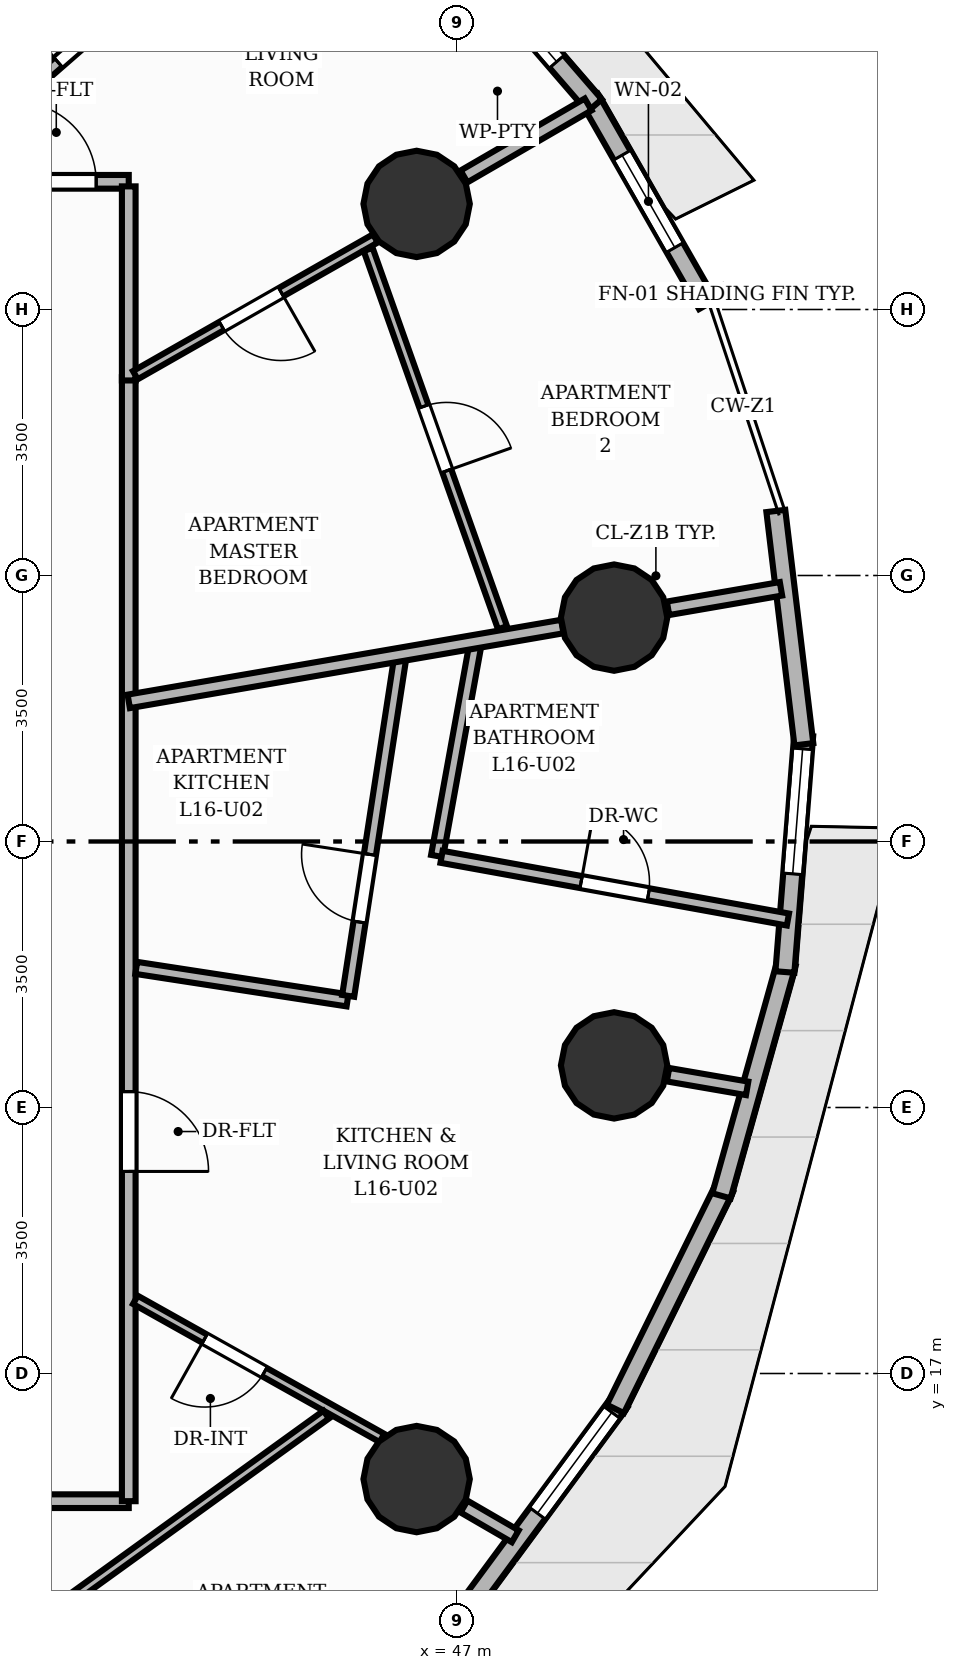
"""IFC4 building model, lengths in metres.
Left out: names, types, materials, properties, quantities, classifications, styles, units other than length and angle.
Written with IfcOpenShell. Run it as: python <this file> out.ifc"""

import sys

from ifc_helpers import new_model, si_unit, direction, frame, frame_2d, origin, origin_2d, place, context, subcontext, project, spatial, rectangle, circle, extrude, element, fill, save


model = new_model("IFC4")
c1 = context("Model", 3, precision=1e-05, world=origin(), true_north=direction((0.0, 1.0)))
c2 = subcontext(c1, "Body", "Model", "MODEL_VIEW")
j1 = project(units=[si_unit("LENGTHUNIT", "METRE"), si_unit("PLANEANGLEUNIT", "RADIAN")], contexts=[c1])
p1 = place(None, origin())
s1 = spatial("IfcSite", under=j1, at=p1, CompositionType="ELEMENT")
p2 = place(p1, origin())
s2 = spatial("IfcBuilding", under=s1, at=p2, CompositionType="ELEMENT")
p3 = place(p2, frame((0.0, 0.0, 56.8)))
s3 = spatial("IfcBuildingStorey", under=s2, at=p3, CompositionType="ELEMENT", Elevation=56.8)
for number, where, z_axis, x_axis in (
    (1, (49.066, 26.946, 0.0), (0.0, 0.0, 1.0), (1.0, 0.0, 0.0)),
    (2, (46.468, 32.389, 0.0), (0.0, 0.0, 1.0), (1.0, 0.0, 0.0)),
    (3, (46.468, 15.611, 0.0), (0.0, 0.0, 1.0), (1.0, 0.0, 0.0)),
    (4, (49.066, 21.054, 0.0), (0.0, 0.0, 1.0), (1.0, 0.0, 0.0)),
):
    element("IfcColumn", number, at=place(p3, frame(where, z_axis=z_axis, x_axis=x_axis)), inside=s3, PredefinedType="COLUMN", context=c2, shape_type="SweptSolid", body=[
        extrude(circle(Radius=0.7, at=origin_2d()), origin(), (0.0, 0.0, 1.0), 3.2),
    ])
p4 = place(p3, frame((48.744, 33.777, 0.0), z_axis=(0.0, 0.0, 1.0), x_axis=(0.496155788519, -0.868233513243, 0.0)))
e5 = element("IfcWall", 5, at=p4, inside=s3, PredefinedType="SOLIDWALL", context=c2, shape_type="SweptSolid", body=[
    extrude(rectangle(XDim=3.121, YDim=0.25, at=frame_2d((1.56, 0.0))), origin(), (0.0, 0.0, 1.0), 2.96),
])
p5 = place(p4, frame((0.86, 0.0, 0.85)))
e6 = element("IfcOpeningElement", 6, at=p5, cuts=e5, PredefinedType="OPENING", context=c2, shape_type="SweptSolid", body=[
    extrude(rectangle(XDim=1.4, YDim=1.55, at=frame_2d((0.7, 0.775))), frame((0.0, 0.135, 0.0), z_axis=(0.0, -1.0, 0.0), x_axis=(1.0, 0.0, 0.0)), (0.0, 0.0, 1.0), 0.27),
])
p6 = place(p3, frame((46.734, 36.086, 0.0), z_axis=(0.0, 0.0, 1.0), x_axis=(0.653770062489, -0.75669327035, 0.0)))
e7 = element("IfcWall", 7, at=p6, inside=s3, PredefinedType="SOLIDWALL", context=c2, shape_type="SweptSolid", body=[
    extrude(rectangle(XDim=3.174, YDim=0.25, at=frame_2d((1.587, 0.0))), origin(), (0.0, 0.0, 1.0), 2.96),
])
p7 = place(p6, frame((0.762, 0.0, 0.85)))
e8 = element("IfcOpeningElement", 8, at=p7, cuts=e7, PredefinedType="OPENING", context=c2, shape_type="SweptSolid", body=[
    extrude(rectangle(XDim=1.65, YDim=1.55, at=frame_2d((0.825, 0.775))), frame((0.0, 0.135, 0.0), z_axis=(0.0, -1.0, 0.0), x_axis=(1.0, 0.0, 0.0)), (0.0, 0.0, 1.0), 0.27),
])
p8 = place(p3, frame((49.14, 16.629, 0.0), z_axis=(0.0, 0.0, 1.0), x_axis=(-0.593762827217, -0.804640109003, 0.0)))
e9 = element("IfcWall", 9, at=p8, inside=s3, PredefinedType="SOLIDWALL", context=c2, shape_type="SweptSolid", body=[
    extrude(rectangle(XDim=3.323, YDim=0.25, at=frame_2d((1.661, 0.0))), origin(), (0.0, 0.0, 1.0), 2.96),
])
p9 = place(p8, frame((0.175, 0.0, 0.85)))
e10 = element("IfcOpeningElement", 10, at=p9, cuts=e9, PredefinedType="OPENING", context=c2, shape_type="SweptSolid", body=[
    extrude(rectangle(XDim=1.65, YDim=1.55, at=frame_2d((0.825, 0.775))), frame((0.0, 0.135, 0.0), z_axis=(0.0, -1.0, 0.0), x_axis=(1.0, 0.0, 0.0)), (0.0, 0.0, 1.0), 0.27),
])
p10 = place(p3, frame((50.518, 19.443, 0.0), z_axis=(0.0, 0.0, 1.0), x_axis=(-0.44260255462, -0.896717892452, 0.0)))
e11 = element("IfcWall", 11, at=p10, inside=s3, PredefinedType="SOLIDWALL", context=c2, shape_type="SweptSolid", body=[
    extrude(rectangle(XDim=3.245, YDim=0.25, at=frame_2d((1.622, 0.0))), origin(), (0.0, 0.0, 1.0), 2.96),
])
p11 = place(p3, frame((51.333, 22.395, 0.0), z_axis=(0.0, 0.0, 1.0), x_axis=(-0.269353183383, -0.963041464632, 0.0)))
e12 = element("IfcWall", 12, at=p11, inside=s3, PredefinedType="SOLIDWALL", context=c2, shape_type="SweptSolid", body=[
    extrude(rectangle(XDim=3.174, YDim=0.25, at=frame_2d((1.587, 0.0))), origin(), (0.0, 0.0, 1.0), 2.96),
])
p12 = place(p3, frame((51.56, 25.394, 0.0), z_axis=(0.0, 0.0, 1.0), x_axis=(-0.079173066737, -0.996860885733, 0.0)))
e13 = element("IfcWall", 13, at=p12, inside=s3, PredefinedType="SOLIDWALL", context=c2, shape_type="SweptSolid", body=[
    extrude(rectangle(XDim=3.121, YDim=0.25, at=frame_2d((1.56, 0.0))), origin(), (0.0, 0.0, 1.0), 2.96),
])
p13 = place(p12, frame((0.175, 0.0, 0.85)))
e14 = element("IfcOpeningElement", 14, at=p13, cuts=e13, PredefinedType="OPENING", context=c2, shape_type="SweptSolid", body=[
    extrude(rectangle(XDim=1.65, YDim=1.55, at=frame_2d((0.825, 0.775))), frame((0.0, 0.135, 0.0), z_axis=(0.0, -1.0, 0.0), x_axis=(1.0, 0.0, 0.0)), (0.0, 0.0, 1.0), 0.27),
])
p14 = place(p3, frame((51.194, 28.349, 0.0), z_axis=(0.0, 0.0, 1.0), x_axis=(0.119310240224, -0.992857022223, 0.0)))
e15 = element("IfcWall", 15, at=p14, inside=s3, PredefinedType="SOLIDWALL", context=c2, shape_type="SweptSolid", body=[
    extrude(rectangle(XDim=3.092, YDim=0.25, at=frame_2d((1.546, 0.0))), origin(), (0.0, 0.0, 1.0), 2.96),
])
p15 = place(p3, frame((49.775, 27.068, 0.0), z_axis=(0.0, 0.0, 1.0), x_axis=(0.985418960314, 0.170145445587, 0.0)))
e16 = element("IfcWall", 16, at=p15, inside=s3, PredefinedType="PARTITIONING", context=c2, shape_type="SweptSolid", body=[
    extrude(rectangle(XDim=1.508, YDim=0.18, at=frame_2d((0.754, 0.0))), origin(), (0.0, 0.0, 1.0), 2.178),
])
p16 = place(p3, frame((47.091, 32.75, 0.0), z_axis=(0.0, 0.0, 1.0), x_axis=(0.865027823723, 0.501723892379, 0.0)))
e17 = element("IfcWall", 17, at=p16, inside=s3, PredefinedType="PARTITIONING", context=c2, shape_type="SweptSolid", body=[
    extrude(rectangle(XDim=1.889, YDim=0.18, at=frame_2d((0.944, 0.0))), origin(), (0.0, 0.0, 1.0), 2.178),
])
p17 = place(p3, frame((47.091, 15.25, 0.0), z_axis=(0.0, 0.0, 1.0), x_axis=(0.86504748832, -0.501689986895, 0.0)))
e18 = element("IfcWall", 18, at=p17, inside=s3, PredefinedType="PARTITIONING", context=c2, shape_type="SweptSolid", body=[
    extrude(rectangle(XDim=0.78, YDim=0.18, at=frame_2d((0.39, 0.0))), origin(), (0.0, 0.0, 1.0), 2.178),
])
p18 = place(p3, frame((49.775, 20.932, 0.0), z_axis=(0.0, 0.0, 1.0), x_axis=(0.985428074572, -0.17009265077, 0.0)))
e19 = element("IfcWall", 19, at=p18, inside=s3, PredefinedType="PARTITIONING", context=c2, shape_type="SweptSolid", body=[
    extrude(rectangle(XDim=1.056, YDim=0.18, at=frame_2d((0.528, 0.0))), origin(), (0.0, 0.0, 1.0), 2.178),
])
p19 = place(p3, frame((42.68, 15.32, 0.0), z_axis=(0.0, 0.0, 1.0), x_axis=(-1.0, 0.0, 0.0)))
e20 = element("IfcWall", 20, at=p19, inside=s3, PredefinedType="PARTITIONING", context=c2, shape_type="SweptSolid", body=[
    extrude(rectangle(XDim=13.87, YDim=0.18, at=frame_2d((6.935, 0.0))), origin(), (0.0, 0.0, 1.0), 2.955),
])
p20 = place(p19, frame((9.866, 0.0, 0.0)))
e21 = element("IfcOpeningElement", 21, at=p20, cuts=e20, PredefinedType="OPENING", context=c2, shape_type="SweptSolid", body=[
    extrude(rectangle(XDim=0.9, YDim=2.1, at=frame_2d((0.45, 1.05))), frame((0.0, 0.1, 0.0), z_axis=(0.0, -1.0, 0.0), x_axis=(1.0, 0.0, 0.0)), (0.0, 0.0, 1.0), 0.2),
])
p21 = place(p3, frame((42.68, 30.109, 0.0), z_axis=(0.0, 0.0, 1.0), x_axis=(0.0, -1.0, 0.0)))
e22 = element("IfcWall", 22, at=p21, inside=s3, PredefinedType="PARTITIONING", context=c2, shape_type="SweptSolid", body=[
    extrude(rectangle(XDim=14.789, YDim=0.18, at=frame_2d((7.395, 0.0))), origin(), (0.0, 0.0, 1.0), 2.955),
])
p22 = place(p21, frame((9.4, 0.0, 0.0)))
e23 = element("IfcOpeningElement", 23, at=p22, cuts=e22, PredefinedType="OPENING", context=c2, shape_type="SweptSolid", body=[
    extrude(rectangle(XDim=1.05, YDim=2.15, at=frame_2d((0.525, 1.075))), frame((0.0, 0.1, 0.0), z_axis=(0.0, -1.0, 0.0), x_axis=(1.0, 0.0, 0.0)), (0.0, 0.0, 1.0), 0.2),
])
p23 = place(p3, frame((33.988, 32.68, 0.0), z_axis=(0.0, 0.0, 1.0), x_axis=(1.0, 0.0, 0.0)))
e24 = element("IfcWall", 24, at=p23, inside=s3, PredefinedType="PARTITIONING", context=c2, shape_type="SweptSolid", body=[
    extrude(rectangle(XDim=8.692, YDim=0.18, at=frame_2d((4.346, 0.0))), origin(), (0.0, 0.0, 1.0), 2.955),
])
p24 = place(p23, frame((7.213, 0.0, 0.0)))
e25 = element("IfcOpeningElement", 25, at=p24, cuts=e24, PredefinedType="OPENING", context=c2, shape_type="SweptSolid", body=[
    extrude(rectangle(XDim=1.05, YDim=2.15, at=frame_2d((0.525, 1.075))), frame((0.0, 0.1, 0.0), z_axis=(0.0, -1.0, 0.0), x_axis=(1.0, 0.0, 0.0)), (0.0, 0.0, 1.0), 0.2),
])
p25 = place(p3, frame((42.68, 32.62, 0.0), z_axis=(0.0, 0.0, 1.0), x_axis=(0.0, -1.0, 0.0)))
e26 = element("IfcWall", 26, at=p25, inside=s3, PredefinedType="PARTITIONING", context=c2, shape_type="SweptSolid", body=[
    extrude(rectangle(XDim=2.554, YDim=0.18, at=frame_2d((1.277, 0.0))), origin(), (0.0, 0.0, 1.0), 2.955),
])
p26 = place(p3, frame((47.248, 26.632, 0.0), z_axis=(0.0, 0.0, 1.0), x_axis=(-0.1781964362, -0.983994933994, 0.0)))
e27 = element("IfcWall", 27, at=p26, inside=s3, PredefinedType="PLUMBINGWALL", context=c2, shape_type="SweptSolid", body=[
    extrude(rectangle(XDim=2.869, YDim=0.16, at=frame_2d((1.435, 0.0))), origin(), (0.0, 0.0, 1.0), 2.955),
])
p27 = place(p3, frame((46.796, 23.799, 0.0), z_axis=(0.0, 0.0, 1.0), x_axis=(0.983988618973, -0.178231304015, 0.0)))
e28 = element("IfcWall", 28, at=p27, inside=s3, PredefinedType="PLUMBINGWALL", context=c2, shape_type="SweptSolid", body=[
    extrude(rectangle(XDim=4.631, YDim=0.16, at=frame_2d((2.316, 0.0))), origin(), (0.0, 0.0, 1.0), 2.955),
])
p28 = place(p27, frame((1.866, 0.0, 0.0)))
e29 = element("IfcOpeningElement", 29, at=p28, cuts=e28, PredefinedType="OPENING", context=c2, shape_type="SweptSolid", body=[
    extrude(rectangle(XDim=0.9, YDim=2.1, at=frame_2d((0.45, 1.05))), frame((0.0, 0.09, 0.0), z_axis=(0.0, -1.0, 0.0), x_axis=(1.0, 0.0, 0.0)), (0.0, 0.0, 1.0), 0.18),
])
p29 = place(p3, frame((46.011, 16.152, 0.0), z_axis=(0.0, 0.0, 1.0), x_axis=(-0.872501537555, 0.488611365978, 0.0)))
e30 = element("IfcWall", 30, at=p29, inside=s3, PredefinedType="PARTITIONING", context=c2, shape_type="SweptSolid", body=[
    extrude(rectangle(XDim=3.719, YDim=0.125, at=frame_2d((1.859, 0.0))), origin(), (0.0, 0.0, 1.0), 2.178),
])
p30 = place(p29, frame((1.773, 0.0, 0.0)))
e31 = element("IfcOpeningElement", 31, at=p30, cuts=e30, PredefinedType="OPENING", context=c2, shape_type="SweptSolid", body=[
    extrude(rectangle(XDim=0.9, YDim=2.1, at=frame_2d((0.45, 1.05))), frame((0.0, 0.073, 0.0), z_axis=(0.0, -1.0, 0.0), x_axis=(1.0, 0.0, 0.0)), (0.0, 0.0, 1.0), 0.145),
])
p31 = place(p3, frame((42.779, 22.337, 0.0), z_axis=(0.0, 0.0, 1.0), x_axis=(0.9883767157, -0.152024563351, 0.0)))
e32 = element("IfcWall", 32, at=p31, inside=s3, PredefinedType="PLUMBINGWALL", context=c2, shape_type="SweptSolid", body=[
    extrude(rectangle(XDim=2.812, YDim=0.16, at=frame_2d((1.406, 0.0))), origin(), (0.0, 0.0, 1.0), 2.178),
])
p32 = place(p3, frame((45.567, 21.969, 0.0), z_axis=(0.0, 0.0, 1.0), x_axis=(0.152061220482, 0.988371076684, 0.0)))
e33 = element("IfcWall", 33, at=p32, inside=s3, PredefinedType="PLUMBINGWALL", context=c2, shape_type="SweptSolid", body=[
    extrude(rectangle(XDim=4.545, YDim=0.16, at=frame_2d((2.273, 0.0))), origin(), (0.0, 0.0, 1.0), 2.955),
])
p33 = place(p32, frame((0.983, 0.0, 0.0)))
e34 = element("IfcOpeningElement", 34, at=p33, cuts=e33, PredefinedType="OPENING", context=c2, shape_type="SweptSolid", body=[
    extrude(rectangle(XDim=0.9, YDim=2.1, at=frame_2d((0.45, 1.05))), frame((0.0, 0.09, 0.0), z_axis=(0.0, -1.0, 0.0), x_axis=(1.0, 0.0, 0.0)), (0.0, 0.0, 1.0), 0.18),
])
p34 = place(p3, frame((42.68, 25.844, 0.0), z_axis=(0.0, 0.0, 1.0), x_axis=(0.985422105898, 0.170127226534, 0.0)))
e35 = element("IfcWall", 35, at=p34, inside=s3, PredefinedType="PARTITIONING", context=c2, shape_type="SweptSolid", body=[
    extrude(rectangle(XDim=5.789, YDim=0.18, at=frame_2d((2.895, 0.0))), origin(), (0.0, 0.0, 1.0), 2.178),
])
p35 = place(p3, frame((45.278, 16.459, 0.0), z_axis=(0.0, 0.0, 1.0), x_axis=(-0.810668637761, -0.585505217526, 0.0)))
e36 = element("IfcWall", 36, at=p35, inside=s3, PredefinedType="PARTITIONING", context=c2, shape_type="SweptSolid", body=[
    extrude(rectangle(XDim=11.55, YDim=0.125, at=frame_2d((5.775, 0.0))), origin(), (0.0, 0.0, 1.0), 2.955),
])
p36 = place(p35, frame((4.625, 0.0, 0.0)))
e37 = element("IfcOpeningElement", 37, at=p36, cuts=e36, PredefinedType="OPENING", context=c2, shape_type="SweptSolid", body=[
    extrude(rectangle(XDim=0.9, YDim=2.1, at=frame_2d((0.45, 1.05))), frame((0.0, 0.073, 0.0), z_axis=(0.0, -1.0, 0.0), x_axis=(1.0, 0.0, 0.0)), (0.0, 0.0, 1.0), 0.145),
])
p37 = place(p3, frame((40.028, 32.746, 0.0), z_axis=(0.0, 0.0, 1.0), x_axis=(0.753328390337, 0.657644536442, 0.0)))
e38 = element("IfcWall", 38, at=p37, inside=s3, PredefinedType="PLUMBINGWALL", context=c2, shape_type="SweptSolid", body=[
    extrude(rectangle(XDim=6.876, YDim=0.16, at=frame_2d((3.438, 0.0))), origin(), (0.0, 0.0, 1.0), 2.955),
])
p38 = place(p37, frame((2.288, 0.0, 0.0)))
e39 = element("IfcOpeningElement", 39, at=p38, cuts=e38, PredefinedType="OPENING", context=c2, shape_type="SweptSolid", body=[
    extrude(rectangle(XDim=0.9, YDim=2.1, at=frame_2d((0.45, 1.05))), frame((0.0, 0.09, 0.0), z_axis=(0.0, -1.0, 0.0), x_axis=(1.0, 0.0, 0.0)), (0.0, 0.0, 1.0), 0.18),
])
p39 = place(p3, frame((45.925, 31.936, 0.0), z_axis=(0.0, 0.0, 1.0), x_axis=(-0.868837650683, -0.49509709831, 0.0)))
e40 = element("IfcWall", 40, at=p39, inside=s3, PredefinedType="PARTITIONING", context=c2, shape_type="SweptSolid", body=[
    extrude(rectangle(XDim=3.635, YDim=0.125, at=frame_2d((1.818, 0.0))), origin(), (0.0, 0.0, 1.0), 2.178),
])
p40 = place(p39, frame((1.428, 0.0, 0.0)))
e41 = element("IfcOpeningElement", 41, at=p40, cuts=e40, PredefinedType="OPENING", context=c2, shape_type="SweptSolid", body=[
    extrude(rectangle(XDim=0.9, YDim=2.1, at=frame_2d((0.45, 1.05))), frame((0.0, 0.073, 0.0), z_axis=(0.0, -1.0, 0.0), x_axis=(1.0, 0.0, 0.0)), (0.0, 0.0, 1.0), 0.145),
])
p41 = place(p3, frame((45.83, 31.79, 0.0), z_axis=(0.0, 0.0, 1.0), x_axis=(0.334664074365, -0.94233749651, 0.0)))
e42 = element("IfcWall", 42, at=p41, inside=s3, PredefinedType="PARTITIONING", context=c2, shape_type="SweptSolid", body=[
    extrude(rectangle(XDim=5.282, YDim=0.125, at=frame_2d((2.641, 0.0))), origin(), (0.0, 0.0, 1.0), 2.955),
])
p42 = place(p41, frame((2.191, 0.0, 0.0)))
e43 = element("IfcOpeningElement", 43, at=p42, cuts=e42, PredefinedType="OPENING", context=c2, shape_type="SweptSolid", body=[
    extrude(rectangle(XDim=0.9, YDim=2.1, at=frame_2d((0.45, 1.05))), frame((0.0, 0.073, 0.0), z_axis=(0.0, -1.0, 0.0), x_axis=(1.0, 0.0, 0.0)), (0.0, 0.0, 1.0), 0.145),
])
p43 = place(p5, origin())
e44 = element("IfcWindow", 44, at=p43, inside=s3, PartitioningType="SINGLE_PANEL", PredefinedType="WINDOW", context=c2, shape_type="SweptSolid", body=[
    extrude(rectangle(XDim=1.4, YDim=1.55, at=frame_2d((0.7, 0.775))), frame((0.0, 0.03, 0.0), z_axis=(0.0, -1.0, 0.0), x_axis=(1.0, 0.0, 0.0)), (0.0, 0.0, 1.0), 0.06),
])
fill(e6, e44)
p44 = place(p7, origin())
e45 = element("IfcWindow", 45, at=p44, inside=s3, PartitioningType="SINGLE_PANEL", PredefinedType="WINDOW", context=c2, shape_type="SweptSolid", body=[
    extrude(rectangle(XDim=1.65, YDim=1.55, at=frame_2d((0.825, 0.775))), frame((0.0, 0.03, 0.0), z_axis=(0.0, -1.0, 0.0), x_axis=(1.0, 0.0, 0.0)), (0.0, 0.0, 1.0), 0.06),
])
fill(e8, e45)
p45 = place(p9, origin())
e46 = element("IfcWindow", 46, at=p45, inside=s3, PartitioningType="SINGLE_PANEL", PredefinedType="WINDOW", context=c2, shape_type="SweptSolid", body=[
    extrude(rectangle(XDim=1.65, YDim=1.55, at=frame_2d((0.825, 0.775))), frame((0.0, 0.03, 0.0), z_axis=(0.0, -1.0, 0.0), x_axis=(1.0, 0.0, 0.0)), (0.0, 0.0, 1.0), 0.06),
])
fill(e10, e46)
p46 = place(p13, origin())
e47 = element("IfcWindow", 47, at=p46, inside=s3, PartitioningType="SINGLE_PANEL", PredefinedType="WINDOW", context=c2, shape_type="SweptSolid", body=[
    extrude(rectangle(XDim=1.65, YDim=1.55, at=frame_2d((0.825, 0.775))), frame((0.0, 0.03, 0.0), z_axis=(0.0, -1.0, 0.0), x_axis=(1.0, 0.0, 0.0)), (0.0, 0.0, 1.0), 0.06),
])
fill(e14, e47)
p47 = place(p22, origin())
e48 = element("IfcDoor", 48, at=p47, inside=s3, OperationType="SINGLE_SWING_RIGHT", PredefinedType="DOOR", context=c2, shape_type="SweptSolid", body=[
    extrude(rectangle(XDim=1.05, YDim=2.15, at=frame_2d((0.525, 1.075))), frame((0.0, 0.025, 0.0), z_axis=(0.0, -1.0, 0.0), x_axis=(1.0, 0.0, 0.0)), (0.0, 0.0, 1.0), 0.05),
])
fill(e23, e48)
p48 = place(p28, origin())
e49 = element("IfcDoor", 49, at=p48, inside=s3, OperationType="SINGLE_SWING_LEFT", PredefinedType="DOOR", context=c2, shape_type="SweptSolid", body=[
    extrude(rectangle(XDim=0.9, YDim=2.1, at=frame_2d((0.45, 1.05))), frame((0.0, 0.025, 0.0), z_axis=(0.0, -1.0, 0.0), x_axis=(1.0, 0.0, 0.0)), (0.0, 0.0, 1.0), 0.05),
])
fill(e29, e49)
p49 = place(p30, origin())
e50 = element("IfcDoor", 50, at=p49, inside=s3, OperationType="SINGLE_SWING_RIGHT", PredefinedType="DOOR", context=c2, shape_type="SweptSolid", body=[
    extrude(rectangle(XDim=0.9, YDim=2.1, at=frame_2d((0.45, 1.05))), frame((0.0, 0.025, 0.0), z_axis=(0.0, -1.0, 0.0), x_axis=(1.0, 0.0, 0.0)), (0.0, 0.0, 1.0), 0.05),
])
fill(e31, e50)
p50 = place(p33, origin())
e51 = element("IfcDoor", 51, at=p50, inside=s3, OperationType="SINGLE_SWING_RIGHT", PredefinedType="DOOR", context=c2, shape_type="SweptSolid", body=[
    extrude(rectangle(XDim=0.9, YDim=2.1, at=frame_2d((0.45, 1.05))), frame((0.0, 0.025, 0.0), z_axis=(0.0, -1.0, 0.0), x_axis=(1.0, 0.0, 0.0)), (0.0, 0.0, 1.0), 0.05),
])
fill(e34, e51)
p51 = place(p24, origin())
e52 = element("IfcDoor", 52, at=p51, inside=s3, OperationType="SINGLE_SWING_LEFT", PredefinedType="DOOR", context=c2, shape_type="SweptSolid", body=[
    extrude(rectangle(XDim=1.05, YDim=2.15, at=frame_2d((0.525, 1.075))), frame((0.0, 0.025, 0.0), z_axis=(0.0, -1.0, 0.0), x_axis=(1.0, 0.0, 0.0)), (0.0, 0.0, 1.0), 0.05),
])
fill(e25, e52)
p52 = place(p38, origin())
e53 = element("IfcDoor", 53, at=p52, inside=s3, OperationType="SINGLE_SWING_RIGHT", PredefinedType="DOOR", context=c2, shape_type="SweptSolid", body=[
    extrude(rectangle(XDim=0.9, YDim=2.1, at=frame_2d((0.45, 1.05))), frame((0.0, 0.025, 0.0), z_axis=(0.0, -1.0, 0.0), x_axis=(1.0, 0.0, 0.0)), (0.0, 0.0, 1.0), 0.05),
])
fill(e39, e53)
p53 = place(p40, origin())
e54 = element("IfcDoor", 54, at=p53, inside=s3, OperationType="SINGLE_SWING_LEFT", PredefinedType="DOOR", context=c2, shape_type="SweptSolid", body=[
    extrude(rectangle(XDim=0.9, YDim=2.1, at=frame_2d((0.45, 1.05))), frame((0.0, 0.025, 0.0), z_axis=(0.0, -1.0, 0.0), x_axis=(1.0, 0.0, 0.0)), (0.0, 0.0, 1.0), 0.05),
])
fill(e41, e54)
p54 = place(p42, origin())
e55 = element("IfcDoor", 55, at=p54, inside=s3, OperationType="SINGLE_SWING_RIGHT", PredefinedType="DOOR", context=c2, shape_type="SweptSolid", body=[
    extrude(rectangle(XDim=0.9, YDim=2.1, at=frame_2d((0.45, 1.05))), frame((0.0, 0.025, 0.0), z_axis=(0.0, -1.0, 0.0), x_axis=(1.0, 0.0, 0.0)), (0.0, 0.0, 1.0), 0.05),
])
fill(e43, e55)
save(model, sys.argv[1])
